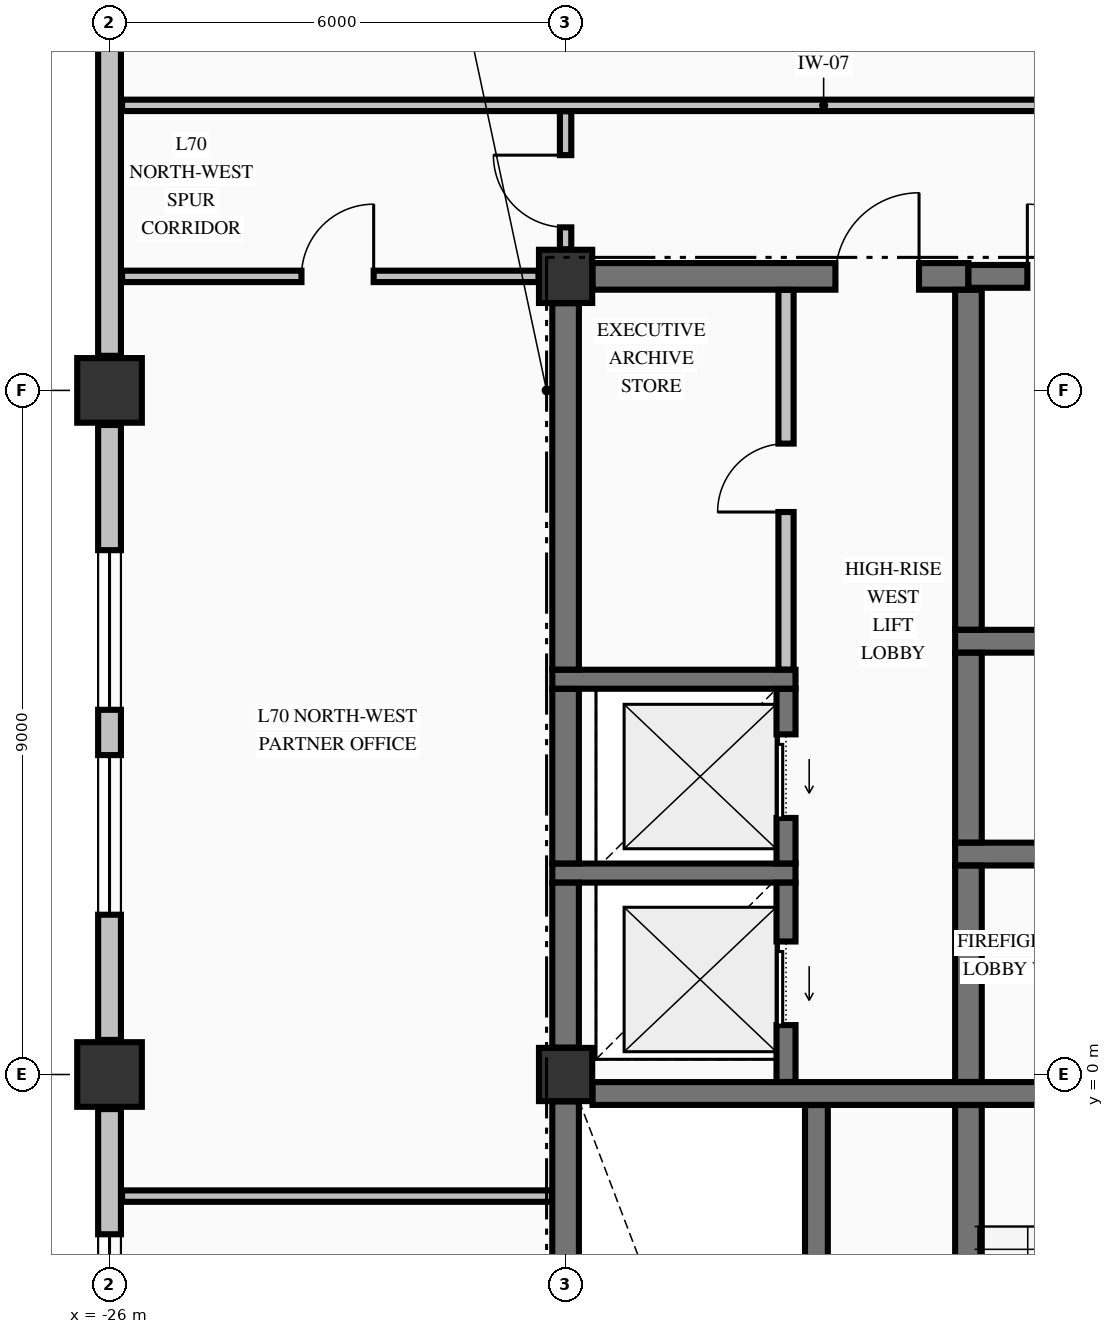
"""IFC4 building model, lengths in metres.
Left out: names, types, materials, properties, quantities, classifications, styles, units other than length and angle.
Written with IfcOpenShell. Run it as: python <this file> out.ifc"""

import sys

from ifc_helpers import new_model, si_unit, direction, frame, frame_2d, origin, origin_2d, place, context, subcontext, project, spatial, rectangle, extrude, element, fill, save


model = new_model("IFC4")
c1 = context("Model", 3, precision=1e-05, world=origin(), true_north=direction((0.0, 1.0)))
c2 = subcontext(c1, "Body", "Model", "MODEL_VIEW")
j1 = project(units=[si_unit("LENGTHUNIT", "METRE"), si_unit("PLANEANGLEUNIT", "RADIAN")], contexts=[c1])
p1 = place(None, origin())
s1 = spatial("IfcSite", under=j1, at=p1, CompositionType="ELEMENT")
p2 = place(p1, origin())
s2 = spatial("IfcBuilding", under=s1, at=p2, CompositionType="ELEMENT")
p3 = place(p2, frame((0.0, 0.0, 264.12)))
s3 = spatial("IfcBuildingStorey", under=s2, at=p3, CompositionType="ELEMENT", Elevation=264.12)
for number, where, z_axis, x_axis in (
    (1, (-26.0, 0.0, -0.25), (0.0, 0.0, 1.0), (1.0, 0.0, 0.0)),
    (2, (-26.0, 9.0, -0.25), (0.0, 0.0, 1.0), (1.0, 0.0, 0.0)),
):
    element("IfcColumn", number, at=place(p3, frame(where, z_axis=z_axis, x_axis=x_axis)), inside=s3, PredefinedType="COLUMN", context=c2, shape_type="SweptSolid", body=[
        extrude(rectangle(XDim=0.85, YDim=0.85, at=origin_2d()), origin(), (0.0, 0.0, 1.0), 3.23),
    ])
for number, where, z_axis, x_axis in (
    (3, (-20.0, 10.5, -0.25), (0.0, 0.0, 1.0), (1.0, 0.0, 0.0)),
    (4, (-20.0, 0.0, -0.25), (0.0, 0.0, 1.0), (1.0, 0.0, 0.0)),
):
    element("IfcColumn", number, at=place(p3, frame(where, z_axis=z_axis, x_axis=x_axis)), inside=s3, PredefinedType="COLUMN", context=c2, shape_type="SweptSolid", body=[
        extrude(rectangle(XDim=0.7, YDim=0.7, at=origin_2d()), origin(), (0.0, 0.0, 1.0), 3.23),
    ])
p4 = place(p3, frame((-26.0, -0.455, 0.0), z_axis=(0.0, 0.0, 1.0), x_axis=(0.0, -1.0, 0.0)))
e5 = element("IfcWall", 5, at=p4, inside=s3, PredefinedType="STANDARD", context=c2, shape_type="SweptSolid", body=[
    extrude(rectangle(XDim=8.09, YDim=0.3, at=frame_2d((4.045, 0.0))), origin(), (0.0, 0.0, 1.0), 2.372),
])
p5 = place(p4, frame((1.647, 0.0, 0.7)))
e6 = element("IfcOpeningElement", 6, at=p5, cuts=e5, PredefinedType="OPENING", context=c2, shape_type="SweptSolid", body=[
    extrude(rectangle(XDim=2.1, YDim=1.5, at=frame_2d((1.05, 0.75))), frame((0.0, 0.16, 0.0), z_axis=(0.0, -1.0, 0.0), x_axis=(1.0, 0.0, 0.0)), (0.0, 0.0, 1.0), 0.32),
])
p6 = place(p4, frame((4.343, 0.0, 0.7)))
e7 = element("IfcOpeningElement", 7, at=p6, cuts=e5, PredefinedType="OPENING", context=c2, shape_type="SweptSolid", body=[
    extrude(rectangle(XDim=2.1, YDim=1.5, at=frame_2d((1.05, 0.75))), frame((0.0, 0.16, 0.0), z_axis=(0.0, -1.0, 0.0), x_axis=(1.0, 0.0, 0.0)), (0.0, 0.0, 1.0), 0.32),
])
p7 = place(p3, frame((-26.0, 8.545, 0.0), z_axis=(0.0, 0.0, 1.0), x_axis=(0.0, -1.0, 0.0)))
e8 = element("IfcWall", 8, at=p7, inside=s3, PredefinedType="STANDARD", context=c2, shape_type="SweptSolid", body=[
    extrude(rectangle(XDim=8.09, YDim=0.3, at=frame_2d((4.045, 0.0))), origin(), (0.0, 0.0, 1.0), 2.372),
])
p8 = place(p7, frame((1.647, 0.0, 0.7)))
e9 = element("IfcOpeningElement", 9, at=p8, cuts=e8, PredefinedType="OPENING", context=c2, shape_type="SweptSolid", body=[
    extrude(rectangle(XDim=2.1, YDim=1.5, at=frame_2d((1.05, 0.75))), frame((0.0, 0.16, 0.0), z_axis=(0.0, -1.0, 0.0), x_axis=(1.0, 0.0, 0.0)), (0.0, 0.0, 1.0), 0.32),
])
p9 = place(p7, frame((4.343, 0.0, 0.7)))
e10 = element("IfcOpeningElement", 10, at=p9, cuts=e8, PredefinedType="OPENING", context=c2, shape_type="SweptSolid", body=[
    extrude(rectangle(XDim=2.1, YDim=1.5, at=frame_2d((1.05, 0.75))), frame((0.0, 0.16, 0.0), z_axis=(0.0, -1.0, 0.0), x_axis=(1.0, 0.0, 0.0)), (0.0, 0.0, 1.0), 0.32),
])
p10 = place(p3, frame((-26.0, 17.545, 0.0), z_axis=(0.0, 0.0, 1.0), x_axis=(0.0, -1.0, 0.0)))
e11 = element("IfcWall", 11, at=p10, inside=s3, PredefinedType="STANDARD", context=c2, shape_type="SweptSolid", body=[
    extrude(rectangle(XDim=8.09, YDim=0.3, at=frame_2d((4.045, 0.0))), origin(), (0.0, 0.0, 1.0), 2.372),
])
p11 = place(p3, frame((-19.646, -0.25, 0.0), z_axis=(0.0, 0.0, 1.0), x_axis=(1.0, 0.0, 0.0)))
e12 = element("IfcWall", 12, at=p11, inside=s3, PredefinedType="SHEAR", context=c2, shape_type="SweptSolid", body=[
    extrude(rectangle(XDim=8.292, YDim=0.3, at=frame_2d((4.146, 0.0))), origin(), (0.0, 0.0, 1.0), 2.98),
])
p12 = place(p11, frame((5.946, 0.0, 0.0)))
e13 = element("IfcOpeningElement", 13, at=p12, cuts=e12, PredefinedType="OPENING", context=c2, shape_type="SweptSolid", body=[
    extrude(rectangle(XDim=1.1, YDim=2.15, at=frame_2d((0.55, 1.075))), frame((0.0, 0.16, 0.0), z_axis=(0.0, -1.0, 0.0), x_axis=(1.0, 0.0, 0.0)), (0.0, 0.0, 1.0), 0.32),
])
p13 = place(p3, frame((-20.175, 2.65, 0.0), z_axis=(0.0, 0.0, 1.0), x_axis=(1.0, 0.0, 0.0)))
e14 = element("IfcWall", 14, at=p13, inside=s3, PredefinedType="SOLIDWALL", context=c2, shape_type="SweptSolid", body=[
    extrude(rectangle(XDim=3.2, YDim=0.25, at=frame_2d((1.6, 0.0))), origin(), (0.0, 0.0, 1.0), 2.98),
])
p14 = place(p3, frame((-14.875, 2.9, 0.0), z_axis=(0.0, 0.0, 1.0), x_axis=(1.0, 0.0, 0.0)))
e15 = element("IfcWall", 15, at=p14, inside=s3, PredefinedType="SHEAR", context=c2, shape_type="SweptSolid", body=[
    extrude(rectangle(XDim=4.025, YDim=0.3, at=frame_2d((2.012, 0.0))), origin(), (0.0, 0.0, 1.0), 2.98),
])
p15 = place(p14, frame((2.075, 0.0, 0.0)))
e16 = element("IfcOpeningElement", 16, at=p15, cuts=e15, PredefinedType="OPENING", context=c2, shape_type="SweptSolid", body=[
    extrude(rectangle(XDim=1.1, YDim=2.2, at=frame_2d((0.55, 1.1))), frame((0.0, 0.16, 0.0), z_axis=(0.0, -1.0, 0.0), x_axis=(1.0, 0.0, 0.0)), (0.0, 0.0, 1.0), 0.32),
])
p16 = place(p3, frame((-20.175, 5.2, 0.0), z_axis=(0.0, 0.0, 1.0), x_axis=(1.0, 0.0, 0.0)))
e17 = element("IfcWall", 17, at=p16, inside=s3, PredefinedType="SOLIDWALL", context=c2, shape_type="SweptSolid", body=[
    extrude(rectangle(XDim=3.2, YDim=0.25, at=frame_2d((1.6, 0.0))), origin(), (0.0, 0.0, 1.0), 2.98),
])
p17 = place(p3, frame((-14.875, 5.7, 0.0), z_axis=(0.0, 0.0, 1.0), x_axis=(1.0, 0.0, 0.0)))
e18 = element("IfcWall", 18, at=p17, inside=s3, PredefinedType="SHEAR", context=c2, shape_type="SweptSolid", body=[
    extrude(rectangle(XDim=4.025, YDim=0.3, at=frame_2d((2.012, 0.0))), origin(), (0.0, 0.0, 1.0), 2.98),
])
p18 = place(p3, frame((-19.646, 10.5, 0.0), z_axis=(0.0, 0.0, 1.0), x_axis=(1.0, 0.0, 0.0)))
e19 = element("IfcWall", 19, at=p18, inside=s3, PredefinedType="SHEAR", context=c2, shape_type="SweptSolid", body=[
    extrude(rectangle(XDim=4.946, YDim=0.35, at=frame_2d((2.473, 0.0))), origin(), (0.0, 0.0, 1.0), 2.98),
])
p19 = place(p18, frame((3.196, 0.0, 0.0)))
e20 = element("IfcOpeningElement", 20, at=p19, cuts=e19, PredefinedType="OPENING", context=c2, shape_type="SweptSolid", body=[
    extrude(rectangle(XDim=1.1, YDim=2.15, at=frame_2d((0.55, 1.075))), frame((0.0, 0.185, 0.0), z_axis=(0.0, -1.0, 0.0), x_axis=(1.0, 0.0, 0.0)), (0.0, 0.0, 1.0), 0.37),
])
p20 = place(p3, frame((-14.7, 10.5, 0.0), z_axis=(0.0, 0.0, 1.0), x_axis=(1.0, 0.0, 0.0)))
e21 = element("IfcWall", 21, at=p20, inside=s3, PredefinedType="SHEAR", context=c2, shape_type="SweptSolid", body=[
    extrude(rectangle(XDim=3.346, YDim=0.3, at=frame_2d((1.673, 0.0))), origin(), (0.0, 0.0, 1.0), 2.98),
])
p21 = place(p20, frame((0.775, 0.0, 0.0)))
e22 = element("IfcOpeningElement", 22, at=p21, cuts=e21, PredefinedType="OPENING", context=c2, shape_type="SweptSolid", body=[
    extrude(rectangle(XDim=0.95, YDim=2.15, at=frame_2d((0.475, 1.075))), frame((0.0, 0.16, 0.0), z_axis=(0.0, -1.0, 0.0), x_axis=(1.0, 0.0, 0.0)), (0.0, 0.0, 1.0), 0.32),
])
p22 = place(p3, frame((-25.835, -1.6, 0.0), z_axis=(0.0, 0.0, 1.0), x_axis=(1.0, 0.0, 0.0)))
e23 = element("IfcWall", 23, at=p22, inside=s3, PredefinedType="PARTITIONING", context=c2, shape_type="SweptSolid", body=[
    extrude(rectangle(XDim=5.657, YDim=0.15, at=frame_2d((2.829, 0.0))), origin(), (0.0, 0.0, 1.0), 2.98),
])
p23 = place(p3, frame((-25.835, 10.5, 0.0), z_axis=(0.0, 0.0, 1.0), x_axis=(1.0, 0.0, 0.0)))
e24 = element("IfcWall", 24, at=p23, inside=s3, PredefinedType="PARTITIONING", context=c2, shape_type="SweptSolid", body=[
    extrude(rectangle(XDim=5.479, YDim=0.15, at=frame_2d((2.74, 0.0))), origin(), (0.0, 0.0, 1.0), 2.98),
])
p24 = place(p23, frame((2.36, 0.0, 0.0)))
e25 = element("IfcOpeningElement", 25, at=p24, cuts=e24, PredefinedType="OPENING", context=c2, shape_type="SweptSolid", body=[
    extrude(rectangle(XDim=0.95, YDim=2.15, at=frame_2d((0.475, 1.075))), frame((0.0, 0.085, 0.0), z_axis=(0.0, -1.0, 0.0), x_axis=(1.0, 0.0, 0.0)), (0.0, 0.0, 1.0), 0.17),
])
p25 = place(p3, frame((-25.835, 12.75, 0.0), z_axis=(0.0, 0.0, 1.0), x_axis=(1.0, 0.0, 0.0)))
e26 = element("IfcWall", 26, at=p25, inside=s3, PredefinedType="PARTITIONING", context=c2, shape_type="SweptSolid", body=[
    extrude(rectangle(XDim=45.91, YDim=0.15, at=frame_2d((22.955, 0.0))), origin(), (0.0, 0.0, 1.0), 2.98),
])
p26 = place(p25, frame((18.46, 0.0, 0.0)))
e27 = element("IfcOpeningElement", 27, at=p26, cuts=e26, PredefinedType="OPENING", context=c2, shape_type="SweptSolid", body=[
    extrude(rectangle(XDim=1.05, YDim=2.15, at=frame_2d((0.525, 1.075))), frame((0.0, 0.085, 0.0), z_axis=(0.0, -1.0, 0.0), x_axis=(1.0, 0.0, 0.0)), (0.0, 0.0, 1.0), 0.17),
])
p27 = place(p25, frame((28.86, 0.0, 0.0)))
e28 = element("IfcOpeningElement", 28, at=p27, cuts=e26, PredefinedType="OPENING", context=c2, shape_type="SweptSolid", body=[
    extrude(rectangle(XDim=1.05, YDim=2.15, at=frame_2d((0.525, 1.075))), frame((0.0, 0.085, 0.0), z_axis=(0.0, -1.0, 0.0), x_axis=(1.0, 0.0, 0.0)), (0.0, 0.0, 1.0), 0.17),
])
p28 = place(p25, frame((39.16, 0.0, 0.0)))
e29 = element("IfcOpeningElement", 29, at=p28, cuts=e26, PredefinedType="OPENING", context=c2, shape_type="SweptSolid", body=[
    extrude(rectangle(XDim=1.05, YDim=2.15, at=frame_2d((0.525, 1.075))), frame((0.0, 0.085, 0.0), z_axis=(0.0, -1.0, 0.0), x_axis=(1.0, 0.0, 0.0)), (0.0, 0.0, 1.0), 0.17),
])
p29 = place(p3, frame((-20.0, -9.596, 0.0), z_axis=(0.0, 0.0, 1.0), x_axis=(0.0, 1.0, 0.0)))
e30 = element("IfcWall", 30, at=p29, inside=s3, PredefinedType="SHEAR", context=c2, shape_type="SweptSolid", body=[
    extrude(rectangle(XDim=9.242, YDim=0.35, at=frame_2d((4.621, 0.0))), origin(), (0.0, 0.0, 1.0), 2.98),
])
p30 = place(p3, frame((-20.0, 0.354, 0.0), z_axis=(0.0, 0.0, 1.0), x_axis=(0.0, 1.0, 0.0)))
e31 = element("IfcWall", 31, at=p30, inside=s3, PredefinedType="SHEAR", context=c2, shape_type="SweptSolid", body=[
    extrude(rectangle(XDim=2.169, YDim=0.35, at=frame_2d((1.084, 0.0))), origin(), (0.0, 0.0, 1.0), 2.98),
])
p31 = place(p3, frame((-20.0, 2.777, 0.0), z_axis=(0.0, 0.0, 1.0), x_axis=(0.0, 1.0, 0.0)))
e32 = element("IfcWall", 32, at=p31, inside=s3, PredefinedType="SHEAR", context=c2, shape_type="SweptSolid", body=[
    extrude(rectangle(XDim=2.296, YDim=0.35, at=frame_2d((1.148, 0.0))), origin(), (0.0, 0.0, 1.0), 2.98),
])
p32 = place(p3, frame((-20.0, 5.327, 0.0), z_axis=(0.0, 0.0, 1.0), x_axis=(0.0, 1.0, 0.0)))
e33 = element("IfcWall", 33, at=p32, inside=s3, PredefinedType="SHEAR", context=c2, shape_type="SweptSolid", body=[
    extrude(rectangle(XDim=4.819, YDim=0.35, at=frame_2d((2.41, 0.0))), origin(), (0.0, 0.0, 1.0), 2.98),
])
p33 = place(p3, frame((-17.1, -0.098, 0.0), z_axis=(0.0, 0.0, 1.0), x_axis=(0.0, 1.0, 0.0)))
e34 = element("IfcWall", 34, at=p33, inside=s3, PredefinedType="SOLIDWALL", context=c2, shape_type="SweptSolid", body=[
    extrude(rectangle(XDim=2.621, YDim=0.25, at=frame_2d((1.311, 0.0))), origin(), (0.0, 0.0, 1.0), 2.98),
])
p34 = place(p33, frame((0.748, 0.0, 0.0)))
e35 = element("IfcOpeningElement", 35, at=p34, cuts=e34, PredefinedType="OPENING", context=c2, shape_type="SweptSolid", body=[
    extrude(rectangle(XDim=1.1, YDim=2.2, at=frame_2d((0.55, 1.1))), frame((0.0, 0.135, 0.0), z_axis=(0.0, -1.0, 0.0), x_axis=(1.0, 0.0, 0.0)), (0.0, 0.0, 1.0), 0.27),
])
p35 = place(p3, frame((-17.1, 2.777, 0.0), z_axis=(0.0, 0.0, 1.0), x_axis=(0.0, 1.0, 0.0)))
e36 = element("IfcWall", 36, at=p35, inside=s3, PredefinedType="SOLIDWALL", context=c2, shape_type="SweptSolid", body=[
    extrude(rectangle(XDim=2.296, YDim=0.25, at=frame_2d((1.148, 0.0))), origin(), (0.0, 0.0, 1.0), 2.98),
])
p36 = place(p35, frame((0.598, 0.0, 0.0)))
e37 = element("IfcOpeningElement", 37, at=p36, cuts=e36, PredefinedType="OPENING", context=c2, shape_type="SweptSolid", body=[
    extrude(rectangle(XDim=1.1, YDim=2.2, at=frame_2d((0.55, 1.1))), frame((0.0, 0.135, 0.0), z_axis=(0.0, -1.0, 0.0), x_axis=(1.0, 0.0, 0.0)), (0.0, 0.0, 1.0), 0.27),
])
p37 = place(p3, frame((-16.7, -9.773, 0.0), z_axis=(0.0, 0.0, 1.0), x_axis=(0.0, 1.0, 0.0)))
e38 = element("IfcWall", 38, at=p37, inside=s3, PredefinedType="SHEAR", context=c2, shape_type="SweptSolid", body=[
    extrude(rectangle(XDim=9.371, YDim=0.3, at=frame_2d((4.686, 0.0))), origin(), (0.0, 0.0, 1.0), 2.98),
])
p38 = place(p3, frame((-14.7, -9.773, 0.0), z_axis=(0.0, 0.0, 1.0), x_axis=(0.0, 1.0, 0.0)))
e39 = element("IfcWall", 39, at=p38, inside=s3, PredefinedType="SHEAR", context=c2, shape_type="SweptSolid", body=[
    extrude(rectangle(XDim=9.371, YDim=0.35, at=frame_2d((4.686, 0.0))), origin(), (0.0, 0.0, 1.0), 2.98),
])
p39 = place(p3, frame((-14.7, -0.098, 0.0), z_axis=(0.0, 0.0, 1.0), x_axis=(0.0, 1.0, 0.0)))
e40 = element("IfcWall", 40, at=p39, inside=s3, PredefinedType="SHEAR", context=c2, shape_type="SweptSolid", body=[
    extrude(rectangle(XDim=2.846, YDim=0.35, at=frame_2d((1.423, 0.0))), origin(), (0.0, 0.0, 1.0), 2.98),
])
p40 = place(p3, frame((-14.7, 3.052, 0.0), z_axis=(0.0, 0.0, 1.0), x_axis=(0.0, 1.0, 0.0)))
e41 = element("IfcWall", 41, at=p40, inside=s3, PredefinedType="SHEAR", context=c2, shape_type="SweptSolid", body=[
    extrude(rectangle(XDim=2.496, YDim=0.35, at=frame_2d((1.248, 0.0))), origin(), (0.0, 0.0, 1.0), 2.98),
])
p41 = place(p3, frame((-14.7, 5.852, 0.0), z_axis=(0.0, 0.0, 1.0), x_axis=(0.0, 1.0, 0.0)))
e42 = element("IfcWall", 42, at=p41, inside=s3, PredefinedType="SHEAR", context=c2, shape_type="SweptSolid", body=[
    extrude(rectangle(XDim=4.471, YDim=0.35, at=frame_2d((2.235, 0.0))), origin(), (0.0, 0.0, 1.0), 2.98),
])
p42 = place(p3, frame((-20.0, 10.856, 0.0), z_axis=(0.0, 0.0, 1.0), x_axis=(0.0, 1.0, 0.0)))
e43 = element("IfcWall", 43, at=p42, inside=s3, PredefinedType="PARTITIONING", context=c2, shape_type="SweptSolid", body=[
    extrude(rectangle(XDim=1.816, YDim=0.15, at=frame_2d((0.908, 0.0))), origin(), (0.0, 0.0, 1.0), 2.98),
])
p43 = place(p42, frame((0.289, 0.0, 0.0)))
e44 = element("IfcOpeningElement", 44, at=p43, cuts=e43, PredefinedType="OPENING", context=c2, shape_type="SweptSolid", body=[
    extrude(rectangle(XDim=0.95, YDim=2.15, at=frame_2d((0.475, 1.075))), frame((0.0, 0.085, 0.0), z_axis=(0.0, -1.0, 0.0), x_axis=(1.0, 0.0, 0.0)), (0.0, 0.0, 1.0), 0.17),
])
p44 = place(p3, frame((-17.1, 5.328, 0.0), z_axis=(0.0, 0.0, 1.0), x_axis=(0.0, 1.0, 0.0)))
e45 = element("IfcWall", 45, at=p44, inside=s3, PredefinedType="PARTITIONING", context=c2, shape_type="SweptSolid", body=[
    extrude(rectangle(XDim=4.994, YDim=0.2, at=frame_2d((2.497, 0.0))), origin(), (0.0, 0.0, 1.0), 2.98),
])
p45 = place(p44, frame((2.072, 0.0, 0.0)))
e46 = element("IfcOpeningElement", 46, at=p45, cuts=e45, PredefinedType="OPENING", context=c2, shape_type="SweptSolid", body=[
    extrude(rectangle(XDim=0.9, YDim=2.15, at=frame_2d((0.45, 1.075))), frame((0.0, 0.11, 0.0), z_axis=(0.0, -1.0, 0.0), x_axis=(1.0, 0.0, 0.0)), (0.0, 0.0, 1.0), 0.22),
])
p46 = place(p5, origin())
e47 = element("IfcWindow", 47, at=p46, inside=s3, PartitioningType="SINGLE_PANEL", PredefinedType="WINDOW", context=c2, shape_type="SweptSolid", body=[
    extrude(rectangle(XDim=2.1, YDim=1.5, at=frame_2d((1.05, 0.75))), frame((0.0, 0.03, 0.0), z_axis=(0.0, -1.0, 0.0), x_axis=(1.0, 0.0, 0.0)), (0.0, 0.0, 1.0), 0.06),
])
fill(e6, e47)
p47 = place(p8, origin())
e48 = element("IfcWindow", 48, at=p47, inside=s3, PartitioningType="SINGLE_PANEL", PredefinedType="WINDOW", context=c2, shape_type="SweptSolid", body=[
    extrude(rectangle(XDim=2.1, YDim=1.5, at=frame_2d((1.05, 0.75))), frame((0.0, 0.03, 0.0), z_axis=(0.0, -1.0, 0.0), x_axis=(1.0, 0.0, 0.0)), (0.0, 0.0, 1.0), 0.06),
])
fill(e9, e48)
p48 = place(p9, origin())
e49 = element("IfcWindow", 49, at=p48, inside=s3, PartitioningType="SINGLE_PANEL", PredefinedType="WINDOW", context=c2, shape_type="SweptSolid", body=[
    extrude(rectangle(XDim=2.1, YDim=1.5, at=frame_2d((1.05, 0.75))), frame((0.0, 0.03, 0.0), z_axis=(0.0, -1.0, 0.0), x_axis=(1.0, 0.0, 0.0)), (0.0, 0.0, 1.0), 0.06),
])
fill(e10, e49)
p49 = place(p21, origin())
e50 = element("IfcDoor", 50, at=p49, inside=s3, OperationType="SINGLE_SWING_LEFT", PredefinedType="DOOR", context=c2, shape_type="SweptSolid", body=[
    extrude(rectangle(XDim=0.95, YDim=2.15, at=frame_2d((0.475, 1.075))), frame((0.0, 0.025, 0.0), z_axis=(0.0, -1.0, 0.0), x_axis=(1.0, 0.0, 0.0)), (0.0, 0.0, 1.0), 0.05),
])
fill(e22, e50)
p50 = place(p34, origin())
e51 = element("IfcDoor", 51, at=p50, inside=s3, OperationType="SLIDING_TO_LEFT", PredefinedType="DOOR", context=c2, shape_type="SweptSolid", body=[
    extrude(rectangle(XDim=1.1, YDim=2.2, at=frame_2d((0.55, 1.1))), frame((0.0, 0.025, 0.0), z_axis=(0.0, -1.0, 0.0), x_axis=(1.0, 0.0, 0.0)), (0.0, 0.0, 1.0), 0.05),
])
fill(e35, e51)
p51 = place(p36, origin())
e52 = element("IfcDoor", 52, at=p51, inside=s3, OperationType="SLIDING_TO_LEFT", PredefinedType="DOOR", context=c2, shape_type="SweptSolid", body=[
    extrude(rectangle(XDim=1.1, YDim=2.2, at=frame_2d((0.55, 1.1))), frame((0.0, 0.025, 0.0), z_axis=(0.0, -1.0, 0.0), x_axis=(1.0, 0.0, 0.0)), (0.0, 0.0, 1.0), 0.05),
])
fill(e37, e52)
p52 = place(p19, origin())
e53 = element("IfcDoor", 53, at=p52, inside=s3, OperationType="SINGLE_SWING_RIGHT", PredefinedType="DOOR", context=c2, shape_type="SweptSolid", body=[
    extrude(rectangle(XDim=1.1, YDim=2.15, at=frame_2d((0.55, 1.075))), frame((0.0, 0.025, 0.0), z_axis=(0.0, -1.0, 0.0), x_axis=(1.0, 0.0, 0.0)), (0.0, 0.0, 1.0), 0.05),
])
fill(e20, e53)
p53 = place(p45, origin())
e54 = element("IfcDoor", 54, at=p53, inside=s3, OperationType="SINGLE_SWING_LEFT", PredefinedType="DOOR", context=c2, shape_type="SweptSolid", body=[
    extrude(rectangle(XDim=0.9, YDim=2.15, at=frame_2d((0.45, 1.075))), frame((0.0, 0.025, 0.0), z_axis=(0.0, -1.0, 0.0), x_axis=(1.0, 0.0, 0.0)), (0.0, 0.0, 1.0), 0.05),
])
fill(e46, e54)
p54 = place(p43, origin())
e55 = element("IfcDoor", 55, at=p54, inside=s3, OperationType="SINGLE_SWING_RIGHT", PredefinedType="DOOR", context=c2, shape_type="SweptSolid", body=[
    extrude(rectangle(XDim=0.95, YDim=2.15, at=frame_2d((0.475, 1.075))), frame((0.0, 0.025, 0.0), z_axis=(0.0, -1.0, 0.0), x_axis=(1.0, 0.0, 0.0)), (0.0, 0.0, 1.0), 0.05),
])
fill(e44, e55)
p55 = place(p24, origin())
e56 = element("IfcDoor", 56, at=p55, inside=s3, OperationType="SINGLE_SWING_RIGHT", PredefinedType="DOOR", context=c2, shape_type="SweptSolid", body=[
    extrude(rectangle(XDim=0.95, YDim=2.15, at=frame_2d((0.475, 1.075))), frame((0.0, 0.025, 0.0), z_axis=(0.0, -1.0, 0.0), x_axis=(1.0, 0.0, 0.0)), (0.0, 0.0, 1.0), 0.05),
])
fill(e25, e56)
save(model, sys.argv[1])
